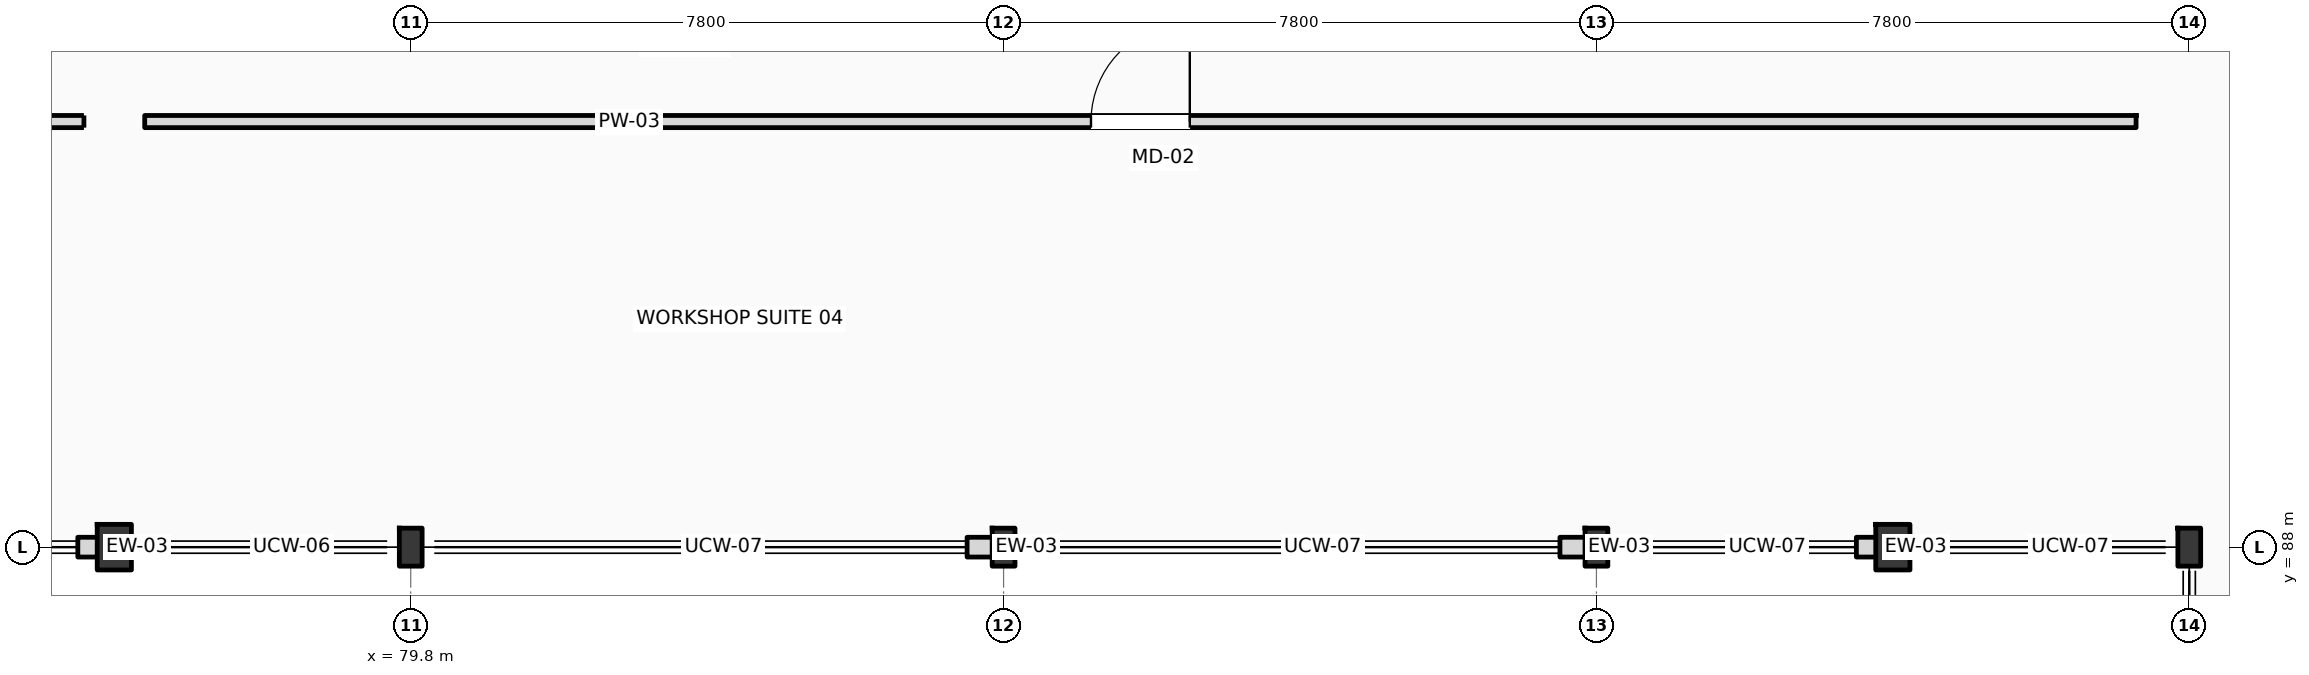
"""IFC4 building model, lengths in metres.
Left out: names, types, materials, properties, quantities, classifications, styles, units other than length and angle.
Written with IfcOpenShell. Run it as: python <this file> out.ifc"""

import sys

from ifc_helpers import new_model, si_unit, direction, frame, frame_2d, origin, origin_2d, place, context, subcontext, project, spatial, rectangle, i_section, extrude, element, fill, save


model = new_model("IFC4")
c1 = context("Model", 3, precision=1e-05, world=origin(), true_north=direction((0.0, 1.0)))
c2 = subcontext(c1, "Body", "Model", "MODEL_VIEW")
j1 = project(units=[si_unit("LENGTHUNIT", "METRE"), si_unit("PLANEANGLEUNIT", "RADIAN")], contexts=[c1])
p1 = place(None, origin())
s1 = spatial("IfcSite", under=j1, at=p1, CompositionType="ELEMENT")
p2 = place(p1, origin())
s2 = spatial("IfcBuilding", under=s1, at=p2, CompositionType="ELEMENT")
p3 = place(p2, frame((0.0, 0.0, 20.4)))
s3 = spatial("IfcBuildingStorey", under=s2, at=p3, CompositionType="ELEMENT", Elevation=20.4)
for number, where, z_axis, x_axis in (
    (1, (79.8, 88.0, 0.0), (0.0, 0.0, 1.0), (1.0, 0.0, 0.0)),
    (2, (87.6, 88.0, 0.0), (0.0, 0.0, 1.0), (1.0, 0.0, 0.0)),
    (3, (95.4, 88.0, 0.0), (0.0, 0.0, 1.0), (1.0, 0.0, 0.0)),
    (4, (103.2, 88.0, 0.0), (0.0, 0.0, 1.0), (1.0, 0.0, 0.0)),
):
    element("IfcColumn", number, at=place(p3, frame(where, z_axis=z_axis, x_axis=x_axis)), inside=s3, PredefinedType="COLUMN", context=c2, shape_type="SweptSolid", body=[
        extrude(i_section(OverallWidth=0.3, OverallDepth=0.5, WebThickness=0.014, FlangeThickness=0.028, FilletRadius=0.027, at=origin_2d()), origin(), (0.0, 0.0, 1.0), 4.2),
    ])
for number, where, z_axis, x_axis in (
    (5, (75.9, 88.0, 0.0), (0.0, 0.0, 1.0), (1.0, 0.0, 0.0)),
    (6, (99.3, 88.0, 0.0), (0.0, 0.0, 1.0), (1.0, 0.0, 0.0)),
):
    element("IfcColumn", number, at=place(p3, frame(where, z_axis=z_axis, x_axis=x_axis)), inside=s3, PredefinedType="PILASTER", context=c2, shape_type="SweptSolid", body=[
        extrude(rectangle(XDim=0.45, YDim=0.6, at=origin_2d()), origin(), (0.0, 0.0, 1.0), 4.2),
    ])
for number, where, z_axis, x_axis in (
    (7, (75.42, 88.0, 0.0), (0.0, 0.0, 1.0), (1.0, 0.0, 0.0)),
    (8, (87.12, 88.0, 0.0), (0.0, 0.0, 1.0), (1.0, 0.0, 0.0)),
    (9, (94.92, 88.0, 0.0), (0.0, 0.0, 1.0), (1.0, 0.0, 0.0)),
    (10, (98.82, 88.0, 0.0), (0.0, 0.0, 1.0), (1.0, 0.0, 0.0)),
):
    element("IfcWall", number, at=place(p3, frame(where, z_axis=z_axis, x_axis=x_axis)), inside=s3, PredefinedType="STANDARD", context=c2, shape_type="SweptSolid", body=[
        extrude(rectangle(XDim=0.96, YDim=0.26, at=frame_2d((0.48, 0.0))), origin(), (0.0, 0.0, 1.0), 3.48),
    ])
p4 = place(p3, frame((49.1, 93.6, 0.0), z_axis=(0.0, 0.0, 1.0), x_axis=(1.0, 0.0, 0.0)))
e11 = element("IfcWall", 11, at=p4, inside=s3, PredefinedType="PARTITIONING", context=c2, shape_type="SweptSolid", body=[
    extrude(rectangle(XDim=26.4, YDim=0.16, at=frame_2d((13.2, 0.0))), origin(), (0.0, 0.0, 1.0), 3.94),
])
p5 = place(p4, frame((12.55, 0.0, 0.0)))
e12 = element("IfcOpeningElement", 12, at=p5, cuts=e11, PredefinedType="OPENING", context=c2, shape_type="SweptSolid", body=[
    extrude(rectangle(XDim=1.3, YDim=2.2, at=frame_2d((0.65, 1.1))), frame((0.0, 0.09, 0.0), z_axis=(0.0, -1.0, 0.0), x_axis=(1.0, 0.0, 0.0)), (0.0, 0.0, 1.0), 0.18),
])
p6 = place(p3, frame((76.3, 93.6, 0.0), z_axis=(0.0, 0.0, 1.0), x_axis=(1.0, 0.0, 0.0)))
e13 = element("IfcWall", 13, at=p6, inside=s3, PredefinedType="PARTITIONING", context=c2, shape_type="SweptSolid", body=[
    extrude(rectangle(XDim=26.2, YDim=0.16, at=frame_2d((13.1, 0.0))), origin(), (0.0, 0.0, 1.0), 3.94),
])
p7 = place(p6, frame((12.45, 0.0, 0.0)))
e14 = element("IfcOpeningElement", 14, at=p7, cuts=e13, PredefinedType="OPENING", context=c2, shape_type="SweptSolid", body=[
    extrude(rectangle(XDim=1.3, YDim=2.2, at=frame_2d((0.65, 1.1))), frame((0.0, 0.09, 0.0), z_axis=(0.0, -1.0, 0.0), x_axis=(1.0, 0.0, 0.0)), (0.0, 0.0, 1.0), 0.18),
])
p8 = place(p7, origin())
e15 = element("IfcDoor", 15, at=p8, inside=s3, OperationType="SINGLE_SWING_RIGHT", PredefinedType="DOOR", context=c2, shape_type="SweptSolid", body=[
    extrude(rectangle(XDim=1.3, YDim=2.2, at=frame_2d((0.65, 1.1))), frame((0.0, 0.025, 0.0), z_axis=(0.0, -1.0, 0.0), x_axis=(1.0, 0.0, 0.0)), (0.0, 0.0, 1.0), 0.05),
])
fill(e14, e15)
save(model, sys.argv[1])
